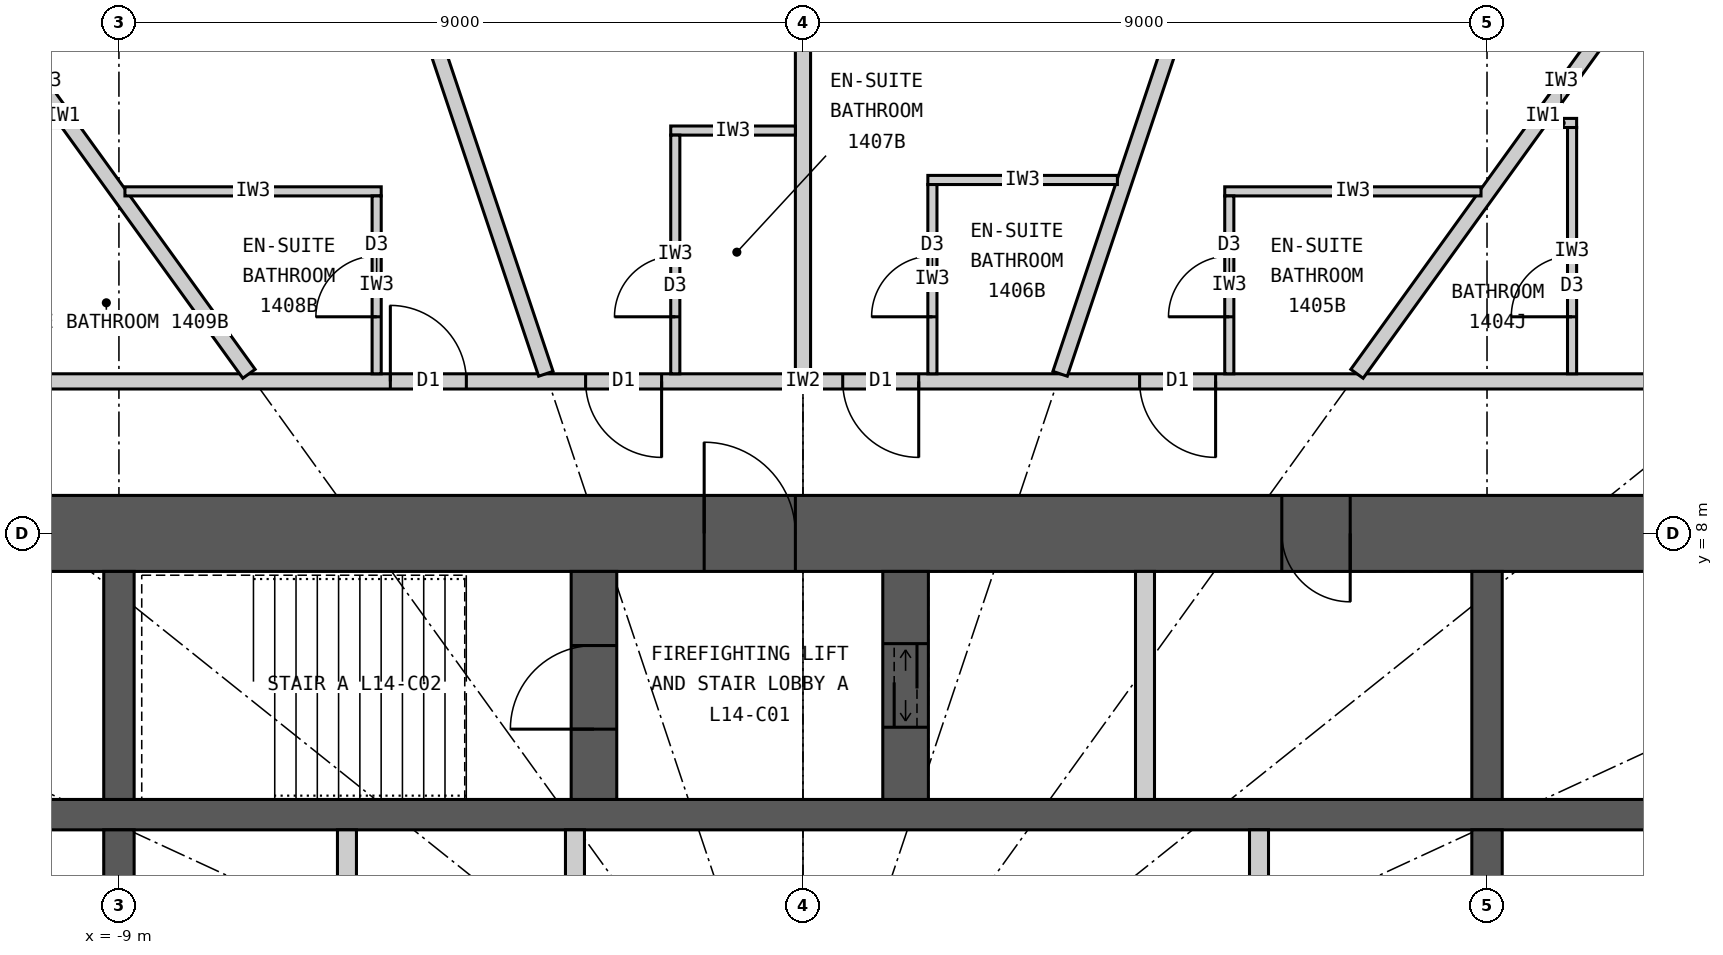
"""IFC4 building model, lengths in metres.
Left out: names, types, materials, properties, quantities, classifications, styles, units other than length and angle.
Written with IfcOpenShell. Run it as: python <this file> out.ifc"""

import sys

from ifc_helpers import new_model, si_unit, direction, frame, frame_2d, origin, place, context, subcontext, project, spatial, rectangle, extrude, element, fill, save


model = new_model("IFC4")
c1 = context("Model", 3, precision=1e-05, world=origin(), true_north=direction((0.0, 1.0)))
c2 = subcontext(c1, "Body", "Model", "MODEL_VIEW")
j1 = project(units=[si_unit("LENGTHUNIT", "METRE"), si_unit("PLANEANGLEUNIT", "RADIAN")], contexts=[c1])
p1 = place(None, origin())
s1 = spatial("IfcSite", under=j1, at=p1, CompositionType="ELEMENT")
p2 = place(p1, origin())
s2 = spatial("IfcBuilding", under=s1, at=p2, CompositionType="ELEMENT")
p3 = place(p2, frame((0.0, 0.0, 60.6)))
s3 = spatial("IfcBuildingStorey", under=s2, at=p3, CompositionType="ELEMENT", Elevation=60.6)
p4 = place(p3, frame((-12.5, 8.0, 0.0), z_axis=(0.0, 0.0, 1.0), x_axis=(1.0, 0.0, 0.0)))
e1 = element("IfcWall", 1, at=p4, inside=s3, PredefinedType="SHEAR", context=c2, shape_type="SweptSolid", body=[
    extrude(rectangle(XDim=25.0, YDim=1.0, at=frame_2d((12.5, 0.0))), origin(), (0.0, 0.0, 1.0), 3.3),
])
p5 = place(p4, frame((11.2, 0.0, 0.0)))
e2 = element("IfcOpeningElement", 2, at=p5, cuts=e1, PredefinedType="OPENING", context=c2, shape_type="SweptSolid", body=[
    extrude(rectangle(XDim=1.2, YDim=2.2, at=frame_2d((0.6, 1.1))), frame((0.0, 0.51, 0.0), z_axis=(0.0, -1.0, 0.0), x_axis=(1.0, 0.0, 0.0)), (0.0, 0.0, 1.0), 1.02),
])
p6 = place(p4, frame((18.8, 0.0, 0.0)))
e3 = element("IfcOpeningElement", 3, at=p6, cuts=e1, PredefinedType="OPENING", context=c2, shape_type="SweptSolid", body=[
    extrude(rectangle(XDim=0.9, YDim=2.2, at=frame_2d((0.45, 1.1))), frame((0.0, 0.51, 0.0), z_axis=(0.0, -1.0, 0.0), x_axis=(1.0, 0.0, 0.0)), (0.0, 0.0, 1.0), 1.02),
])
p7 = place(p3, frame((-11.5, 4.3, 0.0), z_axis=(0.0, 0.0, 1.0), x_axis=(1.0, 0.0, 0.0)))
e4 = element("IfcWall", 4, at=p7, inside=s3, PredefinedType="SHEAR", context=c2, shape_type="SweptSolid", body=[
    extrude(rectangle(XDim=23.0, YDim=0.4, at=frame_2d((11.5, 0.0))), origin(), (0.0, 0.0, 1.0), 3.3),
])
p8 = place(p3, frame((-9.0, 4.5, 0.0), z_axis=(0.0, 0.0, 1.0), x_axis=(0.0, 1.0, 0.0)))
e5 = element("IfcWall", 5, at=p8, inside=s3, PredefinedType="SHEAR", context=c2, shape_type="SweptSolid", body=[
    extrude(rectangle(XDim=3.0, YDim=0.4, at=frame_2d((1.5, 0.0))), origin(), (0.0, 0.0, 1.0), 3.3),
])
p9 = place(p3, frame((-9.0, 1.75, 0.0), z_axis=(0.0, 0.0, 1.0), x_axis=(0.0, 1.0, 0.0)))
e6 = element("IfcWall", 6, at=p9, inside=s3, PredefinedType="SHEAR", context=c2, shape_type="SweptSolid", body=[
    extrude(rectangle(XDim=2.35, YDim=0.4, at=frame_2d((1.175, 0.0))), origin(), (0.0, 0.0, 1.0), 3.3),
])
p10 = place(p3, frame((9.0, 4.5, 0.0), z_axis=(0.0, 0.0, 1.0), x_axis=(0.0, 1.0, 0.0)))
e7 = element("IfcWall", 7, at=p10, inside=s3, PredefinedType="SHEAR", context=c2, shape_type="SweptSolid", body=[
    extrude(rectangle(XDim=3.0, YDim=0.4, at=frame_2d((1.5, 0.0))), origin(), (0.0, 0.0, 1.0), 3.3),
])
p11 = place(p3, frame((9.0, 1.75, 0.0), z_axis=(0.0, 0.0, 1.0), x_axis=(0.0, 1.0, 0.0)))
e8 = element("IfcWall", 8, at=p11, inside=s3, PredefinedType="SHEAR", context=c2, shape_type="SweptSolid", body=[
    extrude(rectangle(XDim=2.35, YDim=0.4, at=frame_2d((1.175, 0.0))), origin(), (0.0, 0.0, 1.0), 3.3),
])
p12 = place(p3, frame((-2.75, 4.5, 0.0), z_axis=(0.0, 0.0, 1.0), x_axis=(0.0, 1.0, 0.0)))
e9 = element("IfcWall", 9, at=p12, inside=s3, PredefinedType="SHEAR", context=c2, shape_type="SweptSolid", body=[
    extrude(rectangle(XDim=3.0, YDim=0.6, at=frame_2d((1.5, 0.0))), origin(), (0.0, 0.0, 1.0), 3.3),
])
p13 = place(p12, frame((0.925, 0.0, 0.0)))
e10 = element("IfcOpeningElement", 10, at=p13, cuts=e9, PredefinedType="OPENING", context=c2, shape_type="SweptSolid", body=[
    extrude(rectangle(XDim=1.1, YDim=2.2, at=frame_2d((0.55, 1.1))), frame((0.0, 0.31, 0.0), z_axis=(0.0, -1.0, 0.0), x_axis=(1.0, 0.0, 0.0)), (0.0, 0.0, 1.0), 0.62),
])
p14 = place(p3, frame((1.35, 4.5, 0.0), z_axis=(0.0, 0.0, 1.0), x_axis=(0.0, 1.0, 0.0)))
e11 = element("IfcWall", 11, at=p14, inside=s3, PredefinedType="SHEAR", context=c2, shape_type="SweptSolid", body=[
    extrude(rectangle(XDim=3.0, YDim=0.6, at=frame_2d((1.5, 0.0))), origin(), (0.0, 0.0, 1.0), 3.3),
])
p15 = place(p14, frame((0.95, 0.0, 0.0)))
e12 = element("IfcOpeningElement", 12, at=p15, cuts=e11, PredefinedType="OPENING", context=c2, shape_type="SweptSolid", body=[
    extrude(rectangle(XDim=1.1, YDim=2.2, at=frame_2d((0.55, 1.1))), frame((0.0, 0.31, 0.0), z_axis=(0.0, -1.0, 0.0), x_axis=(1.0, 0.0, 0.0)), (0.0, 0.0, 1.0), 0.62),
])
p16 = place(p3, frame((4.5, 4.5, 0.0), z_axis=(0.0, 0.0, 1.0), x_axis=(0.0, 1.0, 0.0)))
e13 = element("IfcWall", 13, at=p16, inside=s3, PredefinedType="PARTITIONING", context=c2, shape_type="SweptSolid", body=[
    extrude(rectangle(XDim=3.0, YDim=0.25, at=frame_2d((1.5, 0.0))), origin(), (0.0, 0.0, 1.0), 3.3),
])
for number, where, z_axis, x_axis in (
    (14, (-6.0, 1.75, 0.0), (0.0, 0.0, 1.0), (0.0, 1.0, 0.0)),
    (15, (-3.0, 1.75, 0.0), (0.0, 0.0, 1.0), (0.0, 1.0, 0.0)),
    (16, (6.0, 1.75, 0.0), (0.0, 0.0, 1.0), (0.0, 1.0, 0.0)),
):
    element("IfcWall", number, at=place(p3, frame(where, z_axis=z_axis, x_axis=x_axis)), inside=s3, PredefinedType="PARTITIONING", context=c2, shape_type="SweptSolid", body=[
        extrude(rectangle(XDim=2.35, YDim=0.25, at=frame_2d((1.175, 0.0))), origin(), (0.0, 0.0, 1.0), 3.3),
    ])
p17 = place(p3, frame((-14.1, 10.0, 0.0), z_axis=(0.0, 0.0, 1.0), x_axis=(1.0, 0.0, 0.0)))
e17 = element("IfcWall", 17, at=p17, inside=s3, PredefinedType="PARTITIONING", context=c2, shape_type="SweptSolid", body=[
    extrude(rectangle(XDim=28.2, YDim=0.2, at=frame_2d((14.1, 0.0))), origin(), (0.0, 0.0, 1.0), 3.12),
])
p18 = place(p17, frame((18.529, 0.0, 0.0)))
e18 = element("IfcOpeningElement", 18, at=p18, cuts=e17, PredefinedType="OPENING", context=c2, shape_type="SweptSolid", body=[
    extrude(rectangle(XDim=1.0, YDim=2.2, at=frame_2d((0.5, 1.1))), frame((0.0, 0.11, 0.0), z_axis=(0.0, -1.0, 0.0), x_axis=(1.0, 0.0, 0.0)), (0.0, 0.0, 1.0), 0.22),
])
p19 = place(p17, frame((14.623, 0.0, 0.0)))
e19 = element("IfcOpeningElement", 19, at=p19, cuts=e17, PredefinedType="OPENING", context=c2, shape_type="SweptSolid", body=[
    extrude(rectangle(XDim=1.0, YDim=2.2, at=frame_2d((0.5, 1.1))), frame((0.0, 0.11, 0.0), z_axis=(0.0, -1.0, 0.0), x_axis=(1.0, 0.0, 0.0)), (0.0, 0.0, 1.0), 0.22),
])
p20 = place(p17, frame((11.24, 0.0, 0.0)))
e20 = element("IfcOpeningElement", 20, at=p20, cuts=e17, PredefinedType="OPENING", context=c2, shape_type="SweptSolid", body=[
    extrude(rectangle(XDim=1.0, YDim=2.2, at=frame_2d((0.5, 1.1))), frame((0.0, 0.11, 0.0), z_axis=(0.0, -1.0, 0.0), x_axis=(1.0, 0.0, 0.0)), (0.0, 0.0, 1.0), 0.22),
])
p21 = place(p17, frame((8.671, 0.0, 0.0)))
e21 = element("IfcOpeningElement", 21, at=p21, cuts=e17, PredefinedType="OPENING", context=c2, shape_type="SweptSolid", body=[
    extrude(rectangle(XDim=1.0, YDim=2.2, at=frame_2d((0.5, 1.1))), frame((0.0, 0.11, 0.0), z_axis=(0.0, -1.0, 0.0), x_axis=(1.0, 0.0, 0.0)), (0.0, 0.0, 1.0), 0.22),
])
p22 = place(p17, frame((2.801, 0.0, 0.0)))
e22 = element("IfcOpeningElement", 22, at=p22, cuts=e17, PredefinedType="OPENING", context=c2, shape_type="SweptSolid", body=[
    extrude(rectangle(XDim=1.0, YDim=2.2, at=frame_2d((0.5, 1.1))), frame((0.0, 0.11, 0.0), z_axis=(0.0, -1.0, 0.0), x_axis=(1.0, 0.0, 0.0)), (0.0, 0.0, 1.0), 0.22),
])
p23 = place(p3, frame((7.289, 10.1, 0.0), z_axis=(0.0, 0.0, 1.0), x_axis=(0.585198353053, 0.810890182197, 0.0)))
e23 = element("IfcWall", 23, at=p23, inside=s3, PredefinedType="PARTITIONING", context=c2, shape_type="SweptSolid", body=[
    extrude(rectangle(XDim=8.36, YDim=0.2, at=frame_2d((4.18, 0.0))), origin(), (0.0, 0.0, 1.0), 2.32),
])
p24 = place(p3, frame((3.383, 10.1, 0.0), z_axis=(0.0, 0.0, 1.0), x_axis=(0.31759592231, 0.948226149256, 0.0)))
e24 = element("IfcWall", 24, at=p24, inside=s3, PredefinedType="PARTITIONING", context=c2, shape_type="SweptSolid", body=[
    extrude(rectangle(XDim=9.098, YDim=0.2, at=frame_2d((4.549, 0.0))), origin(), (0.0, 0.0, 1.0), 2.32),
])
p25 = place(p3, frame((0.0, 10.1, 0.0), z_axis=(0.0, 0.0, 1.0), x_axis=(0.0, 1.0, 0.0)))
e25 = element("IfcWall", 25, at=p25, inside=s3, PredefinedType="PARTITIONING", context=c2, shape_type="SweptSolid", body=[
    extrude(rectangle(XDim=9.25, YDim=0.2, at=frame_2d((4.625, 0.0))), origin(), (0.0, 0.0, 1.0), 2.32),
])
p26 = place(p3, frame((-3.383, 10.1, 0.0), z_axis=(0.0, 0.0, 1.0), x_axis=(-0.31759592231, 0.948226149256, 0.0)))
e26 = element("IfcWall", 26, at=p26, inside=s3, PredefinedType="PARTITIONING", context=c2, shape_type="SweptSolid", body=[
    extrude(rectangle(XDim=9.098, YDim=0.2, at=frame_2d((4.549, 0.0))), origin(), (0.0, 0.0, 1.0), 2.32),
])
p27 = place(p3, frame((-7.289, 10.1, 0.0), z_axis=(0.0, 0.0, 1.0), x_axis=(-0.585198353053, 0.810890182197, 0.0)))
e27 = element("IfcWall", 27, at=p27, inside=s3, PredefinedType="PARTITIONING", context=c2, shape_type="SweptSolid", body=[
    extrude(rectangle(XDim=8.36, YDim=0.2, at=frame_2d((4.18, 0.0))), origin(), (0.0, 0.0, 1.0), 2.32),
])
p28 = place(p3, frame((9.771, 13.4, 0.0), z_axis=(0.0, 0.0, 1.0), x_axis=(1.0, 0.0, 0.0)))
e28 = element("IfcWall", 28, at=p28, inside=s3, PredefinedType="PARTITIONING", context=c2, shape_type="SweptSolid", body=[
    extrude(rectangle(XDim=0.408, YDim=0.12, at=frame_2d((0.204, 0.0))), origin(), (0.0, 0.0, 1.0), 3.12),
])
p29 = place(p3, frame((10.119, 10.1, 0.0), z_axis=(0.0, 0.0, 1.0), x_axis=(0.0, 1.0, 0.0)))
e29 = element("IfcWall", 29, at=p29, inside=s3, PredefinedType="PARTITIONING", context=c2, shape_type="SweptSolid", body=[
    extrude(rectangle(XDim=3.24, YDim=0.12, at=frame_2d((1.62, 0.0))), origin(), (0.0, 0.0, 1.0), 3.12),
])
p30 = place(p29, frame((0.75, 0.0, 0.0)))
e30 = element("IfcOpeningElement", 30, at=p30, cuts=e29, PredefinedType="OPENING", context=c2, shape_type="SweptSolid", body=[
    extrude(rectangle(XDim=0.8, YDim=2.1, at=frame_2d((0.4, 1.05))), frame((0.0, 0.07, 0.0), z_axis=(0.0, -1.0, 0.0), x_axis=(1.0, 0.0, 0.0)), (0.0, 0.0, 1.0), 0.14),
])
p31 = place(p3, frame((8.921, 12.5, 0.0), z_axis=(0.0, 0.0, 1.0), x_axis=(-1.0, 0.0, 0.0)))
e31 = element("IfcWall", 31, at=p31, inside=s3, PredefinedType="PARTITIONING", context=c2, shape_type="SweptSolid", body=[
    extrude(rectangle(XDim=3.372, YDim=0.12, at=frame_2d((1.686, 0.0))), origin(), (0.0, 0.0, 1.0), 3.12),
])
p32 = place(p3, frame((5.609, 10.1, 0.0), z_axis=(0.0, 0.0, 1.0), x_axis=(0.0, 1.0, 0.0)))
e32 = element("IfcWall", 32, at=p32, inside=s3, PredefinedType="PARTITIONING", context=c2, shape_type="SweptSolid", body=[
    extrude(rectangle(XDim=2.34, YDim=0.12, at=frame_2d((1.17, 0.0))), origin(), (0.0, 0.0, 1.0), 3.12),
])
p33 = place(p32, frame((0.75, 0.0, 0.0)))
e33 = element("IfcOpeningElement", 33, at=p33, cuts=e32, PredefinedType="OPENING", context=c2, shape_type="SweptSolid", body=[
    extrude(rectangle(XDim=0.8, YDim=2.1, at=frame_2d((0.4, 1.05))), frame((0.0, 0.07, 0.0), z_axis=(0.0, -1.0, 0.0), x_axis=(1.0, 0.0, 0.0)), (0.0, 0.0, 1.0), 0.14),
])
p34 = place(p3, frame((4.137, 12.65, 0.0), z_axis=(0.0, 0.0, 1.0), x_axis=(-1.0, 0.0, 0.0)))
e34 = element("IfcWall", 34, at=p34, inside=s3, PredefinedType="PARTITIONING", context=c2, shape_type="SweptSolid", body=[
    extrude(rectangle(XDim=2.494, YDim=0.12, at=frame_2d((1.247, 0.0))), origin(), (0.0, 0.0, 1.0), 3.12),
])
p35 = place(p3, frame((1.703, 10.1, 0.0), z_axis=(0.0, 0.0, 1.0), x_axis=(0.0, 1.0, 0.0)))
e35 = element("IfcWall", 35, at=p35, inside=s3, PredefinedType="PARTITIONING", context=c2, shape_type="SweptSolid", body=[
    extrude(rectangle(XDim=2.49, YDim=0.12, at=frame_2d((1.245, 0.0))), origin(), (0.0, 0.0, 1.0), 3.12),
])
p36 = place(p35, frame((0.75, 0.0, 0.0)))
e36 = element("IfcOpeningElement", 36, at=p36, cuts=e35, PredefinedType="OPENING", context=c2, shape_type="SweptSolid", body=[
    extrude(rectangle(XDim=0.8, YDim=2.1, at=frame_2d((0.4, 1.05))), frame((0.0, 0.07, 0.0), z_axis=(0.0, -1.0, 0.0), x_axis=(1.0, 0.0, 0.0)), (0.0, 0.0, 1.0), 0.14),
])
p37 = place(p3, frame((-0.1, 13.3, 0.0), z_axis=(0.0, 0.0, 1.0), x_axis=(-1.0, 0.0, 0.0)))
e37 = element("IfcWall", 37, at=p37, inside=s3, PredefinedType="PARTITIONING", context=c2, shape_type="SweptSolid", body=[
    extrude(rectangle(XDim=1.64, YDim=0.12, at=frame_2d((0.82, 0.0))), origin(), (0.0, 0.0, 1.0), 3.12),
])
p38 = place(p3, frame((-1.68, 10.1, 0.0), z_axis=(0.0, 0.0, 1.0), x_axis=(0.0, 1.0, 0.0)))
e38 = element("IfcWall", 38, at=p38, inside=s3, PredefinedType="PARTITIONING", context=c2, shape_type="SweptSolid", body=[
    extrude(rectangle(XDim=3.14, YDim=0.12, at=frame_2d((1.57, 0.0))), origin(), (0.0, 0.0, 1.0), 3.12),
])
p39 = place(p38, frame((0.75, 0.0, 0.0)))
e39 = element("IfcOpeningElement", 39, at=p39, cuts=e38, PredefinedType="OPENING", context=c2, shape_type="SweptSolid", body=[
    extrude(rectangle(XDim=0.8, YDim=2.1, at=frame_2d((0.4, 1.05))), frame((0.0, 0.07, 0.0), z_axis=(0.0, -1.0, 0.0), x_axis=(1.0, 0.0, 0.0)), (0.0, 0.0, 1.0), 0.14),
])
p40 = place(p3, frame((-8.921, 12.5, 0.0), z_axis=(0.0, 0.0, 1.0), x_axis=(1.0, 0.0, 0.0)))
e40 = element("IfcWall", 40, at=p40, inside=s3, PredefinedType="PARTITIONING", context=c2, shape_type="SweptSolid", body=[
    extrude(rectangle(XDim=3.372, YDim=0.12, at=frame_2d((1.686, 0.0))), origin(), (0.0, 0.0, 1.0), 3.12),
])
p41 = place(p3, frame((-5.609, 10.1, 0.0), z_axis=(0.0, 0.0, 1.0), x_axis=(0.0, 1.0, 0.0)))
e41 = element("IfcWall", 41, at=p41, inside=s3, PredefinedType="PARTITIONING", context=c2, shape_type="SweptSolid", body=[
    extrude(rectangle(XDim=2.34, YDim=0.12, at=frame_2d((1.17, 0.0))), origin(), (0.0, 0.0, 1.0), 3.12),
])
p42 = place(p41, frame((0.75, 0.0, 0.0)))
e42 = element("IfcOpeningElement", 42, at=p42, cuts=e41, PredefinedType="OPENING", context=c2, shape_type="SweptSolid", body=[
    extrude(rectangle(XDim=0.8, YDim=2.1, at=frame_2d((0.4, 1.05))), frame((0.0, 0.07, 0.0), z_axis=(0.0, -1.0, 0.0), x_axis=(1.0, 0.0, 0.0)), (0.0, 0.0, 1.0), 0.14),
])
p43 = place(p3, frame((-9.771, 13.4, 0.0), z_axis=(0.0, 0.0, 1.0), x_axis=(-1.0, 0.0, 0.0)))
e43 = element("IfcWall", 43, at=p43, inside=s3, PredefinedType="PARTITIONING", context=c2, shape_type="SweptSolid", body=[
    extrude(rectangle(XDim=0.408, YDim=0.12, at=frame_2d((0.204, 0.0))), origin(), (0.0, 0.0, 1.0), 3.12),
])
p44 = place(p30, origin())
e44 = element("IfcDoor", 44, at=p44, inside=s3, OperationType="SINGLE_SWING_LEFT", PredefinedType="DOOR", context=c2, shape_type="SweptSolid", body=[
    extrude(rectangle(XDim=0.8, YDim=2.1, at=frame_2d((0.4, 1.05))), frame((0.0, 0.025, 0.0), z_axis=(0.0, -1.0, 0.0), x_axis=(1.0, 0.0, 0.0)), (0.0, 0.0, 1.0), 0.05),
])
fill(e30, e44)
p45 = place(p33, origin())
e45 = element("IfcDoor", 45, at=p45, inside=s3, OperationType="SINGLE_SWING_LEFT", PredefinedType="DOOR", context=c2, shape_type="SweptSolid", body=[
    extrude(rectangle(XDim=0.8, YDim=2.1, at=frame_2d((0.4, 1.05))), frame((0.0, 0.025, 0.0), z_axis=(0.0, -1.0, 0.0), x_axis=(1.0, 0.0, 0.0)), (0.0, 0.0, 1.0), 0.05),
])
fill(e33, e45)
p46 = place(p18, origin())
e46 = element("IfcDoor", 46, at=p46, inside=s3, OperationType="SINGLE_SWING_RIGHT", PredefinedType="DOOR", context=c2, shape_type="SweptSolid", body=[
    extrude(rectangle(XDim=1.0, YDim=2.2, at=frame_2d((0.5, 1.1))), frame((0.0, 0.025, 0.0), z_axis=(0.0, -1.0, 0.0), x_axis=(1.0, 0.0, 0.0)), (0.0, 0.0, 1.0), 0.05),
])
fill(e18, e46)
p47 = place(p36, origin())
e47 = element("IfcDoor", 47, at=p47, inside=s3, OperationType="SINGLE_SWING_LEFT", PredefinedType="DOOR", context=c2, shape_type="SweptSolid", body=[
    extrude(rectangle(XDim=0.8, YDim=2.1, at=frame_2d((0.4, 1.05))), frame((0.0, 0.025, 0.0), z_axis=(0.0, -1.0, 0.0), x_axis=(1.0, 0.0, 0.0)), (0.0, 0.0, 1.0), 0.05),
])
fill(e36, e47)
p48 = place(p19, origin())
e48 = element("IfcDoor", 48, at=p48, inside=s3, OperationType="SINGLE_SWING_RIGHT", PredefinedType="DOOR", context=c2, shape_type="SweptSolid", body=[
    extrude(rectangle(XDim=1.0, YDim=2.2, at=frame_2d((0.5, 1.1))), frame((0.0, 0.025, 0.0), z_axis=(0.0, -1.0, 0.0), x_axis=(1.0, 0.0, 0.0)), (0.0, 0.0, 1.0), 0.05),
])
fill(e19, e48)
p49 = place(p39, origin())
e49 = element("IfcDoor", 49, at=p49, inside=s3, OperationType="SINGLE_SWING_LEFT", PredefinedType="DOOR", context=c2, shape_type="SweptSolid", body=[
    extrude(rectangle(XDim=0.8, YDim=2.1, at=frame_2d((0.4, 1.05))), frame((0.0, 0.025, 0.0), z_axis=(0.0, -1.0, 0.0), x_axis=(1.0, 0.0, 0.0)), (0.0, 0.0, 1.0), 0.05),
])
fill(e39, e49)
p50 = place(p20, origin())
e50 = element("IfcDoor", 50, at=p50, inside=s3, OperationType="SINGLE_SWING_RIGHT", PredefinedType="DOOR", context=c2, shape_type="SweptSolid", body=[
    extrude(rectangle(XDim=1.0, YDim=2.2, at=frame_2d((0.5, 1.1))), frame((0.0, 0.025, 0.0), z_axis=(0.0, -1.0, 0.0), x_axis=(1.0, 0.0, 0.0)), (0.0, 0.0, 1.0), 0.05),
])
fill(e20, e50)
p51 = place(p42, origin())
e51 = element("IfcDoor", 51, at=p51, inside=s3, OperationType="SINGLE_SWING_LEFT", PredefinedType="DOOR", context=c2, shape_type="SweptSolid", body=[
    extrude(rectangle(XDim=0.8, YDim=2.1, at=frame_2d((0.4, 1.05))), frame((0.0, 0.025, 0.0), z_axis=(0.0, -1.0, 0.0), x_axis=(1.0, 0.0, 0.0)), (0.0, 0.0, 1.0), 0.05),
])
fill(e42, e51)
p52 = place(p21, origin())
e52 = element("IfcDoor", 52, at=p52, inside=s3, OperationType="SINGLE_SWING_LEFT", PredefinedType="DOOR", context=c2, shape_type="SweptSolid", body=[
    extrude(rectangle(XDim=1.0, YDim=2.2, at=frame_2d((0.5, 1.1))), frame((0.0, 0.025, 0.0), z_axis=(0.0, -1.0, 0.0), x_axis=(1.0, 0.0, 0.0)), (0.0, 0.0, 1.0), 0.05),
])
fill(e21, e52)
p53 = place(p5, origin())
e53 = element("IfcDoor", 53, at=p53, inside=s3, OperationType="SINGLE_SWING_LEFT", PredefinedType="DOOR", context=c2, shape_type="SweptSolid", body=[
    extrude(rectangle(XDim=1.2, YDim=2.2, at=frame_2d((0.6, 1.1))), frame((0.0, 0.025, 0.0), z_axis=(0.0, -1.0, 0.0), x_axis=(1.0, 0.0, 0.0)), (0.0, 0.0, 1.0), 0.05),
])
fill(e2, e53)
p54 = place(p13, origin())
e54 = element("IfcDoor", 54, at=p54, inside=s3, OperationType="SINGLE_SWING_LEFT", PredefinedType="DOOR", context=c2, shape_type="SweptSolid", body=[
    extrude(rectangle(XDim=1.1, YDim=2.2, at=frame_2d((0.55, 1.1))), frame((0.0, 0.025, 0.0), z_axis=(0.0, -1.0, 0.0), x_axis=(1.0, 0.0, 0.0)), (0.0, 0.0, 1.0), 0.05),
])
fill(e10, e54)
p55 = place(p15, origin())
e55 = element("IfcDoor", 55, at=p55, inside=s3, OperationType="DOUBLE_DOOR_SLIDING", PredefinedType="DOOR", context=c2, shape_type="SweptSolid", body=[
    extrude(rectangle(XDim=1.1, YDim=2.2, at=frame_2d((0.55, 1.1))), frame((0.0, 0.025, 0.0), z_axis=(0.0, -1.0, 0.0), x_axis=(1.0, 0.0, 0.0)), (0.0, 0.0, 1.0), 0.05),
])
fill(e12, e55)
p56 = place(p6, origin())
e56 = element("IfcDoor", 56, at=p56, inside=s3, OperationType="SINGLE_SWING_RIGHT", PredefinedType="DOOR", context=c2, shape_type="SweptSolid", body=[
    extrude(rectangle(XDim=0.9, YDim=2.2, at=frame_2d((0.45, 1.1))), frame((0.0, 0.025, 0.0), z_axis=(0.0, -1.0, 0.0), x_axis=(1.0, 0.0, 0.0)), (0.0, 0.0, 1.0), 0.05),
])
fill(e3, e56)
save(model, sys.argv[1])
